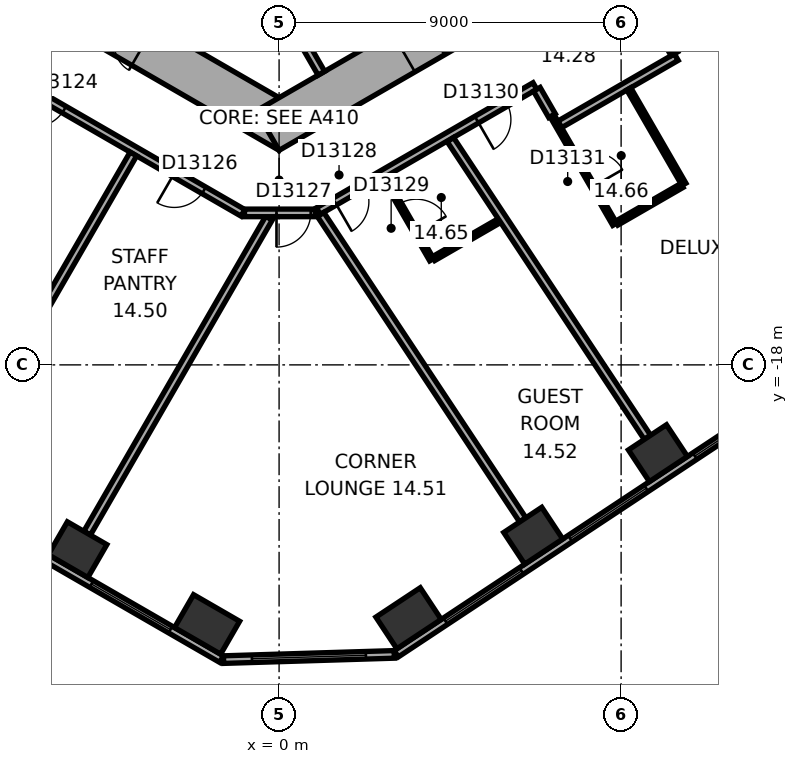
"""IFC4 building model, lengths in metres.
Left out: names, types, materials, properties, quantities, classifications, styles, units other than length and angle.
Written with IfcOpenShell. Run it as: python <this file> out.ifc"""

import sys

from ifc_helpers import new_model, si_unit, direction, frame, frame_2d, origin, origin_2d, place, context, subcontext, project, spatial, rectangle, extrude, element, fill, save


model = new_model("IFC4")
c1 = context("Model", 3, precision=1e-05, world=origin(), true_north=direction((0.0, 1.0)))
c2 = subcontext(c1, "Body", "Model", "MODEL_VIEW")
j1 = project(units=[si_unit("LENGTHUNIT", "METRE"), si_unit("PLANEANGLEUNIT", "RADIAN")], contexts=[c1])
p1 = place(None, origin())
s1 = spatial("IfcSite", under=j1, at=p1, CompositionType="ELEMENT")
p2 = place(p1, origin())
s2 = spatial("IfcBuilding", under=s1, at=p2, CompositionType="ELEMENT")
p3 = place(p2, frame((0.0, 0.0, 67.1)))
s3 = spatial("IfcBuildingStorey", under=s2, at=p3, CompositionType="ELEMENT", Elevation=67.1)
p4 = place(p3, frame((-5.302, -22.862, 0.0), z_axis=(0.0, 0.0, 1.0), x_axis=(0.866025403784, -0.5, 0.0)))
e1 = element("IfcColumn", 1, at=p4, inside=s3, PredefinedType="COLUMN", context=c2, shape_type="SweptSolid", body=[
    extrude(rectangle(XDim=1.2, YDim=1.0, at=origin_2d()), origin(), (0.0, 0.0, 1.0), 3.3),
])
for number, where, z_axis, x_axis in (
    (2, (-1.895, -24.829, 0.0), (0.0, 0.0, 1.0), (0.866, -0.5, 0.0)),
    (3, (3.407, -24.667, 0.0), (0.0, 0.0, 1.0), (0.834, 0.552, 0.0)),
):
    element("IfcColumn", number, at=place(p3, frame(where, z_axis=z_axis, x_axis=x_axis)), inside=s3, PredefinedType="COLUMN", context=c2, shape_type="SweptSolid", body=[
        extrude(rectangle(XDim=1.4, YDim=1.0, at=origin_2d()), origin(), (0.0, 0.0, 1.0), 3.3),
    ])
for number, where, z_axis, x_axis in (
    (4, (6.688, -22.496, 0.0), (0.0, 0.0, 1.0), (0.834, 0.552, 0.0)),
    (5, (9.969, -20.324, 0.0), (0.0, 0.0, 1.0), (0.834, 0.552, 0.0)),
):
    element("IfcColumn", number, at=place(p3, frame(where, z_axis=z_axis, x_axis=x_axis)), inside=s3, PredefinedType="COLUMN", context=c2, shape_type="SweptSolid", body=[
        extrude(rectangle(XDim=1.2, YDim=1.0, at=origin_2d()), origin(), (0.0, 0.0, 1.0), 3.3),
    ])
p5 = place(p3, frame((-10.4, -5.658, 0.0), z_axis=(0.0, 0.0, 1.0), x_axis=(0.866021384402, -0.500006961711, 0.0)))
e6 = element("IfcWall", 6, at=p5, inside=s3, PredefinedType="SHEAR", context=c2, shape_type="SweptSolid", body=[
    extrude(rectangle(XDim=12.355, YDim=1.2, at=frame_2d((6.178, 0.0))), origin(), (0.0, 0.0, 1.0), 3.3),
])
p6 = place(p5, frame((6.378, 0.0, 0.0)))
e7 = element("IfcOpeningElement", 7, at=p6, cuts=e6, PredefinedType="OPENING", context=c2, shape_type="SweptSolid", body=[
    extrude(rectangle(XDim=1.5, YDim=2.1, at=frame_2d((0.75, 1.05))), frame((0.0, 0.61, 0.0), z_axis=(0.0, -1.0, 0.0), x_axis=(1.0, 0.0, 0.0)), (0.0, 0.0, 1.0), 1.22),
])
p7 = place(p5, frame((3.228, 0.0, 0.0)))
e8 = element("IfcOpeningElement", 8, at=p7, cuts=e6, PredefinedType="OPENING", context=c2, shape_type="SweptSolid", body=[
    extrude(rectangle(XDim=0.9, YDim=2.1, at=frame_2d((0.45, 1.05))), frame((0.0, 0.61, 0.0), z_axis=(0.0, -1.0, 0.0), x_axis=(1.0, 0.0, 0.0)), (0.0, 0.0, 1.0), 1.22),
])
p8 = place(p3, frame((-0.3, -11.836, 0.0), z_axis=(0.0, 0.0, 1.0), x_axis=(0.866021384402, 0.500006961711, 0.0)))
e9 = element("IfcWall", 9, at=p8, inside=s3, PredefinedType="SHEAR", context=c2, shape_type="SweptSolid", body=[
    extrude(rectangle(XDim=12.355, YDim=1.2, at=frame_2d((6.178, 0.0))), origin(), (0.0, 0.0, 1.0), 3.3),
])
p9 = place(p8, frame((4.128, 0.0, 0.0)))
e10 = element("IfcOpeningElement", 10, at=p9, cuts=e9, PredefinedType="OPENING", context=c2, shape_type="SweptSolid", body=[
    extrude(rectangle(XDim=0.9, YDim=2.1, at=frame_2d((0.45, 1.05))), frame((0.0, 0.61, 0.0), z_axis=(0.0, -1.0, 0.0), x_axis=(1.0, 0.0, 0.0)), (0.0, 0.0, 1.0), 1.22),
])
p10 = place(p8, frame((7.928, 0.0, 0.0)))
e11 = element("IfcOpeningElement", 11, at=p10, cuts=e9, PredefinedType="OPENING", context=c2, shape_type="SweptSolid", body=[
    extrude(rectangle(XDim=1.1, YDim=2.1, at=frame_2d((0.55, 1.05))), frame((0.0, 0.61, 0.0), z_axis=(0.0, -1.0, 0.0), x_axis=(1.0, 0.0, 0.0)), (0.0, 0.0, 1.0), 1.22),
])
p11 = place(p3, frame((-19.914, -15.119, 0.0), z_axis=(0.0, 0.0, 1.0), x_axis=(0.866025418898, -0.499999973822, 0.0)))
e12 = element("IfcWall", 12, at=p11, inside=s3, PredefinedType="STANDARD", context=c2, shape_type="SweptSolid", body=[
    extrude(rectangle(XDim=21.246, YDim=0.2, at=frame_2d((10.623, 0.0))), origin(), (0.0, 0.0, 1.0), 3.3),
])
p12 = place(p11, frame((1.555, 0.0, 0.8)))
e13 = element("IfcOpeningElement", 13, at=p12, cuts=e12, PredefinedType="OPENING", context=c2, shape_type="SweptSolid", body=[
    extrude(rectangle(XDim=2.4, YDim=1.7, at=frame_2d((1.2, 0.85))), frame((0.0, 0.11, 0.0), z_axis=(0.0, -1.0, 0.0), x_axis=(1.0, 0.0, 0.0)), (0.0, 0.0, 1.0), 0.22),
])
p13 = place(p11, frame((5.489, 0.0, 0.8)))
e14 = element("IfcOpeningElement", 14, at=p13, cuts=e12, PredefinedType="OPENING", context=c2, shape_type="SweptSolid", body=[
    extrude(rectangle(XDim=2.4, YDim=1.7, at=frame_2d((1.2, 0.85))), frame((0.0, 0.11, 0.0), z_axis=(0.0, -1.0, 0.0), x_axis=(1.0, 0.0, 0.0)), (0.0, 0.0, 1.0), 0.22),
])
p14 = place(p11, frame((9.424, 0.0, 0.8)))
e15 = element("IfcOpeningElement", 15, at=p14, cuts=e12, PredefinedType="OPENING", context=c2, shape_type="SweptSolid", body=[
    extrude(rectangle(XDim=2.4, YDim=1.7, at=frame_2d((1.2, 0.85))), frame((0.0, 0.11, 0.0), z_axis=(0.0, -1.0, 0.0), x_axis=(1.0, 0.0, 0.0)), (0.0, 0.0, 1.0), 0.22),
])
p15 = place(p11, frame((13.358, 0.0, 0.8)))
e16 = element("IfcOpeningElement", 16, at=p15, cuts=e12, PredefinedType="OPENING", context=c2, shape_type="SweptSolid", body=[
    extrude(rectangle(XDim=2.4, YDim=1.7, at=frame_2d((1.2, 0.85))), frame((0.0, 0.11, 0.0), z_axis=(0.0, -1.0, 0.0), x_axis=(1.0, 0.0, 0.0)), (0.0, 0.0, 1.0), 0.22),
])
p16 = place(p11, frame((17.293, 0.0, 0.8)))
e17 = element("IfcOpeningElement", 17, at=p16, cuts=e12, PredefinedType="OPENING", context=c2, shape_type="SweptSolid", body=[
    extrude(rectangle(XDim=2.4, YDim=1.7, at=frame_2d((1.2, 0.85))), frame((0.0, 0.11, 0.0), z_axis=(0.0, -1.0, 0.0), x_axis=(1.0, 0.0, 0.0)), (0.0, 0.0, 1.0), 0.22),
])
p17 = place(p3, frame((-1.461, -25.755, 0.0), z_axis=(0.0, 0.0, 1.0), x_axis=(0.999533823446, 0.030530898895, 0.0)))
e18 = element("IfcWall", 18, at=p17, inside=s3, PredefinedType="STANDARD", context=c2, shape_type="SweptSolid", body=[
    extrude(rectangle(XDim=4.494, YDim=0.2, at=frame_2d((2.247, 0.0))), origin(), (0.0, 0.0, 1.0), 3.3),
])
p18 = place(p17, frame((0.747, 0.0, 0.8)))
e19 = element("IfcOpeningElement", 19, at=p18, cuts=e18, PredefinedType="OPENING", context=c2, shape_type="SweptSolid", body=[
    extrude(rectangle(XDim=3.0, YDim=1.7, at=frame_2d((1.5, 0.85))), frame((0.0, 0.11, 0.0), z_axis=(0.0, -1.0, 0.0), x_axis=(1.0, 0.0, 0.0)), (0.0, 0.0, 1.0), 0.22),
])
p19 = place(p3, frame((3.083, -25.601, 0.0), z_axis=(0.0, 0.0, 1.0), x_axis=(0.833884295743, 0.551939291329, 0.0)))
e20 = element("IfcWall", 20, at=p19, inside=s3, PredefinedType="STANDARD", context=c2, shape_type="SweptSolid", body=[
    extrude(rectangle(XDim=21.246, YDim=0.2, at=frame_2d((10.623, 0.0))), origin(), (0.0, 0.0, 1.0), 3.3),
])
p20 = place(p19, frame((1.553, 0.0, 0.8)))
e21 = element("IfcOpeningElement", 21, at=p20, cuts=e20, PredefinedType="OPENING", context=c2, shape_type="SweptSolid", body=[
    extrude(rectangle(XDim=2.4, YDim=1.7, at=frame_2d((1.2, 0.85))), frame((0.0, 0.11, 0.0), z_axis=(0.0, -1.0, 0.0), x_axis=(1.0, 0.0, 0.0)), (0.0, 0.0, 1.0), 0.22),
])
p21 = place(p19, frame((5.488, 0.0, 0.8)))
e22 = element("IfcOpeningElement", 22, at=p21, cuts=e20, PredefinedType="OPENING", context=c2, shape_type="SweptSolid", body=[
    extrude(rectangle(XDim=2.4, YDim=1.7, at=frame_2d((1.2, 0.85))), frame((0.0, 0.11, 0.0), z_axis=(0.0, -1.0, 0.0), x_axis=(1.0, 0.0, 0.0)), (0.0, 0.0, 1.0), 0.22),
])
p22 = place(p19, frame((9.422, 0.0, 0.8)))
e23 = element("IfcOpeningElement", 23, at=p22, cuts=e20, PredefinedType="OPENING", context=c2, shape_type="SweptSolid", body=[
    extrude(rectangle(XDim=2.4, YDim=1.7, at=frame_2d((1.2, 0.85))), frame((0.0, 0.11, 0.0), z_axis=(0.0, -1.0, 0.0), x_axis=(1.0, 0.0, 0.0)), (0.0, 0.0, 1.0), 0.22),
])
p23 = place(p19, frame((13.357, 0.0, 0.8)))
e24 = element("IfcOpeningElement", 24, at=p23, cuts=e20, PredefinedType="OPENING", context=c2, shape_type="SweptSolid", body=[
    extrude(rectangle(XDim=2.4, YDim=1.7, at=frame_2d((1.2, 0.85))), frame((0.0, 0.11, 0.0), z_axis=(0.0, -1.0, 0.0), x_axis=(1.0, 0.0, 0.0)), (0.0, 0.0, 1.0), 0.22),
])
p24 = place(p19, frame((17.291, 0.0, 0.8)))
e25 = element("IfcOpeningElement", 25, at=p24, cuts=e20, PredefinedType="OPENING", context=c2, shape_type="SweptSolid", body=[
    extrude(rectangle(XDim=2.4, YDim=1.7, at=frame_2d((1.2, 0.85))), frame((0.0, 0.11, 0.0), z_axis=(0.0, -1.0, 0.0), x_axis=(1.0, 0.0, 0.0)), (0.0, 0.0, 1.0), 0.22),
])
p25 = place(p3, frame((0.013, -8.422, 0.0), z_axis=(0.0, 0.0, 1.0), x_axis=(0.500077893725, -0.86598042715, 0.0)))
e26 = element("IfcWall", 26, at=p25, inside=s3, PredefinedType="PARTITIONING", context=c2, shape_type="SweptSolid", body=[
    extrude(rectangle(XDim=2.2, YDim=0.2, at=frame_2d((1.1, 0.0))), origin(), (0.0, 0.0, 1.0), 3.05),
])
p26 = place(p3, frame((-11.615, -7.843, 0.0), z_axis=(0.0, 0.0, 1.0), x_axis=(0.866026466995, -0.499998158461, 0.0)))
e27 = element("IfcWall", 27, at=p26, inside=s3, PredefinedType="PARTITIONING", context=c2, shape_type="SweptSolid", body=[
    extrude(rectangle(XDim=12.315, YDim=0.2, at=frame_2d((6.158, 0.0))), origin(), (0.0, 0.0, 1.0), 3.05),
])
p27 = place(p26, frame((5.983, 0.0, 0.0)))
e28 = element("IfcOpeningElement", 28, at=p27, cuts=e27, PredefinedType="OPENING", context=c2, shape_type="SweptSolid", body=[
    extrude(rectangle(XDim=0.9, YDim=2.1, at=frame_2d((0.45, 1.05))), frame((0.0, 0.11, 0.0), z_axis=(0.0, -1.0, 0.0), x_axis=(1.0, 0.0, 0.0)), (0.0, 0.0, 1.0), 0.22),
])
p28 = place(p26, frame((10.229, 0.0, 0.0)))
e29 = element("IfcOpeningElement", 29, at=p28, cuts=e27, PredefinedType="OPENING", context=c2, shape_type="SweptSolid", body=[
    extrude(rectangle(XDim=0.9, YDim=2.1, at=frame_2d((0.45, 1.05))), frame((0.0, 0.11, 0.0), z_axis=(0.0, -1.0, 0.0), x_axis=(1.0, 0.0, 0.0)), (0.0, 0.0, 1.0), 0.22),
])
p29 = place(p3, frame((-8.46, -20.461, 0.0), z_axis=(0.0, 0.0, 1.0), x_axis=(0.499999662836, 0.866025598446, 0.0)))
e30 = element("IfcWall", 30, at=p29, inside=s3, PredefinedType="PARTITIONING", context=c2, shape_type="SweptSolid", body=[
    extrude(rectangle(XDim=9.25, YDim=0.2, at=frame_2d((4.625, 0.0))), origin(), (0.0, 0.0, 1.0), 3.05),
])
p30 = place(p3, frame((-5.052, -22.429, 0.0), z_axis=(0.0, 0.0, 1.0), x_axis=(0.500004329283, 0.866022904257, 0.0)))
e31 = element("IfcWall", 31, at=p30, inside=s3, PredefinedType="PARTITIONING", context=c2, shape_type="SweptSolid", body=[
    extrude(rectangle(XDim=9.572, YDim=0.2, at=frame_2d((4.786, 0.0))), origin(), (0.0, 0.0, 1.0), 3.05),
])
p31 = place(p3, frame((-0.91, -14.001, 0.0), z_axis=(0.0, 0.0, 1.0), x_axis=(1.0, 0.0, 0.0)))
e32 = element("IfcWall", 32, at=p31, inside=s3, PredefinedType="PARTITIONING", context=c2, shape_type="SweptSolid", body=[
    extrude(rectangle(XDim=1.86, YDim=0.2, at=frame_2d((0.93, 0.0))), origin(), (0.0, 0.0, 1.0), 3.05),
])
p32 = place(p31, frame((0.842, 0.0, 0.0)))
e33 = element("IfcOpeningElement", 33, at=p32, cuts=e32, PredefinedType="OPENING", context=c2, shape_type="SweptSolid", body=[
    extrude(rectangle(XDim=0.9, YDim=2.1, at=frame_2d((0.45, 1.05))), frame((0.0, 0.11, 0.0), z_axis=(0.0, -1.0, 0.0), x_axis=(1.0, 0.0, 0.0)), (0.0, 0.0, 1.0), 0.22),
])
p33 = place(p3, frame((1.033, -13.953, 0.0), z_axis=(0.0, 0.0, 1.0), x_axis=(0.866017531406, 0.500013635111, 0.0)))
e34 = element("IfcWall", 34, at=p33, inside=s3, PredefinedType="PARTITIONING", context=c2, shape_type="SweptSolid", body=[
    extrude(rectangle(XDim=6.58, YDim=0.2, at=frame_2d((3.29, 0.0))), origin(), (0.0, 0.0, 1.0), 3.05),
])
p34 = place(p33, frame((0.496, 0.0, 0.0)))
e35 = element("IfcOpeningElement", 35, at=p34, cuts=e34, PredefinedType="OPENING", context=c2, shape_type="SweptSolid", body=[
    extrude(rectangle(XDim=0.9, YDim=2.1, at=frame_2d((0.45, 1.05))), frame((0.0, 0.11, 0.0), z_axis=(0.0, -1.0, 0.0), x_axis=(1.0, 0.0, 0.0)), (0.0, 0.0, 1.0), 0.22),
])
p35 = place(p33, frame((4.811, 0.0, 0.0)))
e36 = element("IfcOpeningElement", 36, at=p35, cuts=e34, PredefinedType="OPENING", context=c2, shape_type="SweptSolid", body=[
    extrude(rectangle(XDim=0.9, YDim=2.1, at=frame_2d((0.45, 1.05))), frame((0.0, 0.11, 0.0), z_axis=(0.0, -1.0, 0.0), x_axis=(1.0, 0.0, 0.0)), (0.0, 0.0, 1.0), 0.22),
])
p36 = place(p3, frame((4.015, -15.233, 0.0), z_axis=(0.0, 0.0, 1.0), x_axis=(-0.499961950354, 0.866047370643, 0.0)))
e37 = element("IfcWall", 37, at=p36, inside=s3, PredefinedType="PARTITIONING", context=c2, shape_type="SweptSolid", body=[
    extrude(rectangle(XDim=2.5, YDim=0.12, at=frame_2d((1.25, 0.0))), origin(), (0.0, 0.0, 1.0), 3.05),
])
p37 = place(p36, frame((0.8, 0.0, 0.0)))
e38 = element("IfcOpeningElement", 38, at=p37, cuts=e37, PredefinedType="OPENING", context=c2, shape_type="SweptSolid", body=[
    extrude(rectangle(XDim=0.9, YDim=2.1, at=frame_2d((0.45, 1.05))), frame((0.0, 0.07, 0.0), z_axis=(0.0, -1.0, 0.0), x_axis=(1.0, 0.0, 0.0)), (0.0, 0.0, 1.0), 0.14),
])
p38 = place(p3, frame((5.798, -14.204, 0.0), z_axis=(0.0, 0.0, 1.0), x_axis=(-0.865972029493, -0.500092435591, 0.0)))
e39 = element("IfcWall", 39, at=p38, inside=s3, PredefinedType="PARTITIONING", context=c2, shape_type="SweptSolid", body=[
    extrude(rectangle(XDim=1.999, YDim=0.12, at=frame_2d((1.0, 0.0))), origin(), (0.0, 0.0, 1.0), 3.05),
])
p39 = place(p3, frame((6.412, -22.079, 0.0), z_axis=(0.0, 0.0, 1.0), x_axis=(-0.551919507115, 0.83389739037, 0.0)))
e40 = element("IfcWall", 40, at=p39, inside=s3, PredefinedType="PARTITIONING", context=c2, shape_type="SweptSolid", body=[
    extrude(rectangle(XDim=9.635, YDim=0.2, at=frame_2d((4.817, 0.0))), origin(), (0.0, 0.0, 1.0), 3.05),
])
p40 = place(p3, frame((6.782, -10.749, 0.0), z_axis=(0.0, 0.0, 1.0), x_axis=(0.500170954823, -0.865926680471, 0.0)))
e41 = element("IfcWall", 41, at=p40, inside=s3, PredefinedType="PARTITIONING", context=c2, shape_type="SweptSolid", body=[
    extrude(rectangle(XDim=0.801, YDim=0.2, at=frame_2d((0.4, 0.0))), origin(), (0.0, 0.0, 1.0), 3.05),
])
p41 = place(p3, frame((7.385, -11.673, 0.0), z_axis=(0.0, 0.0, 1.0), x_axis=(0.866037524642, 0.499979005472, 0.0)))
e42 = element("IfcWall", 42, at=p41, inside=s3, PredefinedType="PARTITIONING", context=c2, shape_type="SweptSolid", body=[
    extrude(rectangle(XDim=3.542, YDim=0.2, at=frame_2d((1.771, 0.0))), origin(), (0.0, 0.0, 1.0), 3.05),
])
p42 = place(p3, frame((8.833, -14.301, 0.0), z_axis=(0.0, 0.0, 1.0), x_axis=(-0.499936836718, 0.866061868051, 0.0)))
e43 = element("IfcWall", 43, at=p42, inside=s3, PredefinedType="PARTITIONING", context=c2, shape_type="SweptSolid", body=[
    extrude(rectangle(XDim=3.188, YDim=0.12, at=frame_2d((1.594, 0.0))), origin(), (0.0, 0.0, 1.0), 3.05),
])
p43 = place(p42, frame((1.144, 0.0, 0.0)))
e44 = element("IfcOpeningElement", 44, at=p43, cuts=e43, PredefinedType="OPENING", context=c2, shape_type="SweptSolid", body=[
    extrude(rectangle(XDim=0.9, YDim=2.1, at=frame_2d((0.45, 1.05))), frame((0.0, 0.07, 0.0), z_axis=(0.0, -1.0, 0.0), x_axis=(1.0, 0.0, 0.0)), (0.0, 0.0, 1.0), 0.14),
])
p44 = place(p3, frame((9.203, -10.738, 0.0), z_axis=(0.0, 0.0, 1.0), x_axis=(0.50005036918, -0.865996321171, 0.0)))
e45 = element("IfcWall", 45, at=p44, inside=s3, PredefinedType="PARTITIONING", context=c2, shape_type="SweptSolid", body=[
    extrude(rectangle(XDim=2.9, YDim=0.12, at=frame_2d((1.45, 0.0))), origin(), (0.0, 0.0, 1.0), 3.05),
])
p45 = place(p3, frame((9.693, -19.907, 0.0), z_axis=(0.0, 0.0, 1.0), x_axis=(-0.551938394837, 0.833884889121, 0.0)))
e46 = element("IfcWall", 46, at=p45, inside=s3, PredefinedType="PARTITIONING", context=c2, shape_type="SweptSolid", body=[
    extrude(rectangle(XDim=9.394, YDim=0.2, at=frame_2d((4.697, 0.0))), origin(), (0.0, 0.0, 1.0), 2.6),
])
p46 = place(p3, frame((10.402, -9.815, 0.0), z_axis=(0.0, 0.0, 1.0), x_axis=(-0.499968756647, 0.866043441391, 0.0)))
e47 = element("IfcWall", 47, at=p46, inside=s3, PredefinedType="PARTITIONING", context=c2, shape_type="SweptSolid", body=[
    extrude(rectangle(XDim=1.001, YDim=0.2, at=frame_2d((0.5, 0.0))), origin(), (0.0, 0.0, 1.0), 3.05),
])
p47 = place(p3, frame((10.601, -13.28, 0.0), z_axis=(0.0, 0.0, 1.0), x_axis=(-0.866044057189, -0.499967689963, 0.0)))
e48 = element("IfcWall", 48, at=p47, inside=s3, PredefinedType="PARTITIONING", context=c2, shape_type="SweptSolid", body=[
    extrude(rectangle(XDim=1.982, YDim=0.12, at=frame_2d((0.991, 0.0))), origin(), (0.0, 0.0, 1.0), 3.05),
])
p48 = place(p3, frame((16.255, -15.564, 0.0), z_axis=(0.0, 0.0, 1.0), x_axis=(-0.55192208744, 0.833895682562, 0.0)))
e49 = element("IfcWall", 49, at=p48, inside=s3, PredefinedType="PARTITIONING", context=c2, shape_type="SweptSolid", body=[
    extrude(rectangle(XDim=8.913, YDim=0.2, at=frame_2d((4.457, 0.0))), origin(), (0.0, 0.0, 1.0), 2.6),
])
p49 = place(p16, origin())
e50 = element("IfcWindow", 50, at=p49, inside=s3, PartitioningType="SINGLE_PANEL", PredefinedType="WINDOW", context=c2, shape_type="SweptSolid", body=[
    extrude(rectangle(XDim=2.4, YDim=1.7, at=frame_2d((1.2, 0.85))), frame((0.0, 0.03, 0.0), z_axis=(0.0, -1.0, 0.0), x_axis=(1.0, 0.0, 0.0)), (0.0, 0.0, 1.0), 0.06),
])
fill(e17, e50)
p50 = place(p18, origin())
e51 = element("IfcWindow", 51, at=p50, inside=s3, PartitioningType="SINGLE_PANEL", PredefinedType="WINDOW", context=c2, shape_type="SweptSolid", body=[
    extrude(rectangle(XDim=3.0, YDim=1.7, at=frame_2d((1.5, 0.85))), frame((0.0, 0.03, 0.0), z_axis=(0.0, -1.0, 0.0), x_axis=(1.0, 0.0, 0.0)), (0.0, 0.0, 1.0), 0.06),
])
fill(e19, e51)
p51 = place(p20, origin())
e52 = element("IfcWindow", 52, at=p51, inside=s3, PartitioningType="SINGLE_PANEL", PredefinedType="WINDOW", context=c2, shape_type="SweptSolid", body=[
    extrude(rectangle(XDim=2.4, YDim=1.7, at=frame_2d((1.2, 0.85))), frame((0.0, 0.03, 0.0), z_axis=(0.0, -1.0, 0.0), x_axis=(1.0, 0.0, 0.0)), (0.0, 0.0, 1.0), 0.06),
])
fill(e21, e52)
p52 = place(p21, origin())
e53 = element("IfcWindow", 53, at=p52, inside=s3, PartitioningType="SINGLE_PANEL", PredefinedType="WINDOW", context=c2, shape_type="SweptSolid", body=[
    extrude(rectangle(XDim=2.4, YDim=1.7, at=frame_2d((1.2, 0.85))), frame((0.0, 0.03, 0.0), z_axis=(0.0, -1.0, 0.0), x_axis=(1.0, 0.0, 0.0)), (0.0, 0.0, 1.0), 0.06),
])
fill(e22, e53)
p53 = place(p22, origin())
e54 = element("IfcWindow", 54, at=p53, inside=s3, PartitioningType="SINGLE_PANEL", PredefinedType="WINDOW", context=c2, shape_type="SweptSolid", body=[
    extrude(rectangle(XDim=2.4, YDim=1.7, at=frame_2d((1.2, 0.85))), frame((0.0, 0.03, 0.0), z_axis=(0.0, -1.0, 0.0), x_axis=(1.0, 0.0, 0.0)), (0.0, 0.0, 1.0), 0.06),
])
fill(e23, e54)
p54 = place(p9, origin())
e55 = element("IfcDoor", 55, at=p54, inside=s3, OperationType="SINGLE_SWING_LEFT", PredefinedType="DOOR", context=c2, shape_type="SweptSolid", body=[
    extrude(rectangle(XDim=0.9, YDim=2.1, at=frame_2d((0.45, 1.05))), frame((0.0, 0.025, 0.0), z_axis=(0.0, -1.0, 0.0), x_axis=(1.0, 0.0, 0.0)), (0.0, 0.0, 1.0), 0.05),
])
fill(e10, e55)
p55 = place(p27, origin())
e56 = element("IfcDoor", 56, at=p55, inside=s3, OperationType="SINGLE_SWING_LEFT", PredefinedType="DOOR", context=c2, shape_type="SweptSolid", body=[
    extrude(rectangle(XDim=0.9, YDim=2.1, at=frame_2d((0.45, 1.05))), frame((0.0, 0.025, 0.0), z_axis=(0.0, -1.0, 0.0), x_axis=(1.0, 0.0, 0.0)), (0.0, 0.0, 1.0), 0.05),
])
fill(e28, e56)
p56 = place(p28, origin())
e57 = element("IfcDoor", 57, at=p56, inside=s3, OperationType="SINGLE_SWING_LEFT", PredefinedType="DOOR", context=c2, shape_type="SweptSolid", body=[
    extrude(rectangle(XDim=0.9, YDim=2.1, at=frame_2d((0.45, 1.05))), frame((0.0, 0.025, 0.0), z_axis=(0.0, -1.0, 0.0), x_axis=(1.0, 0.0, 0.0)), (0.0, 0.0, 1.0), 0.05),
])
fill(e29, e57)
p57 = place(p32, origin())
e58 = element("IfcDoor", 58, at=p57, inside=s3, OperationType="SINGLE_SWING_LEFT", PredefinedType="DOOR", context=c2, shape_type="SweptSolid", body=[
    extrude(rectangle(XDim=0.9, YDim=2.1, at=frame_2d((0.45, 1.05))), frame((0.0, 0.025, 0.0), z_axis=(0.0, -1.0, 0.0), x_axis=(1.0, 0.0, 0.0)), (0.0, 0.0, 1.0), 0.05),
])
fill(e33, e58)
p58 = place(p34, origin())
e59 = element("IfcDoor", 59, at=p58, inside=s3, OperationType="SINGLE_SWING_LEFT", PredefinedType="DOOR", context=c2, shape_type="SweptSolid", body=[
    extrude(rectangle(XDim=0.9, YDim=2.1, at=frame_2d((0.45, 1.05))), frame((0.0, 0.025, 0.0), z_axis=(0.0, -1.0, 0.0), x_axis=(1.0, 0.0, 0.0)), (0.0, 0.0, 1.0), 0.05),
])
fill(e35, e59)
p59 = place(p37, origin())
e60 = element("IfcDoor", 60, at=p59, inside=s3, OperationType="SINGLE_SWING_LEFT", PredefinedType="DOOR", context=c2, shape_type="SweptSolid", body=[
    extrude(rectangle(XDim=0.9, YDim=2.1, at=frame_2d((0.45, 1.05))), frame((0.0, 0.025, 0.0), z_axis=(0.0, -1.0, 0.0), x_axis=(1.0, 0.0, 0.0)), (0.0, 0.0, 1.0), 0.05),
])
fill(e38, e60)
p60 = place(p35, origin())
e61 = element("IfcDoor", 61, at=p60, inside=s3, OperationType="SINGLE_SWING_LEFT", PredefinedType="DOOR", context=c2, shape_type="SweptSolid", body=[
    extrude(rectangle(XDim=0.9, YDim=2.1, at=frame_2d((0.45, 1.05))), frame((0.0, 0.025, 0.0), z_axis=(0.0, -1.0, 0.0), x_axis=(1.0, 0.0, 0.0)), (0.0, 0.0, 1.0), 0.05),
])
fill(e36, e61)
p61 = place(p43, origin())
e62 = element("IfcDoor", 62, at=p61, inside=s3, OperationType="SINGLE_SWING_LEFT", PredefinedType="DOOR", context=c2, shape_type="SweptSolid", body=[
    extrude(rectangle(XDim=0.9, YDim=2.1, at=frame_2d((0.45, 1.05))), frame((0.0, 0.025, 0.0), z_axis=(0.0, -1.0, 0.0), x_axis=(1.0, 0.0, 0.0)), (0.0, 0.0, 1.0), 0.05),
])
fill(e44, e62)
save(model, sys.argv[1])
